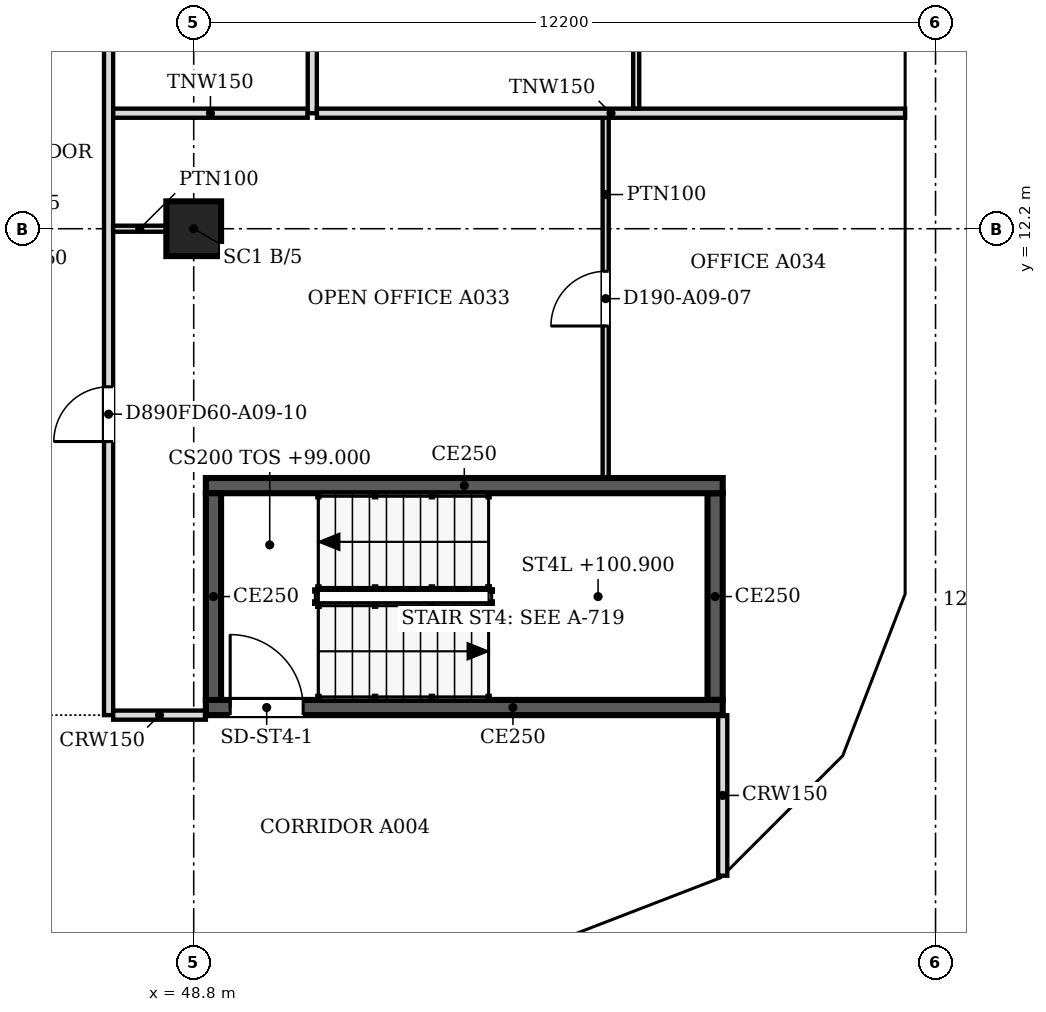
"""IFC4 building model, lengths in metres.
Left out: names, types, materials, properties, quantities, classifications, styles, units other than length and angle.
Written with IfcOpenShell. Run it as: python <this file> out.ifc"""

import sys

from ifc_helpers import new_model, si_unit, direction, frame, frame_2d, origin, origin_2d, place, context, subcontext, project, spatial, polyline, rectangle, outline, extrude, faceted_brep, source, transform, mapped, element, fill, save


model = new_model("IFC4")
c1 = context("Model", 3, precision=1e-05, world=origin(), true_north=direction((0.0, 1.0)))
c2 = subcontext(c1, "Body", "Model", "MODEL_VIEW")
j1 = project(units=[si_unit("LENGTHUNIT", "METRE"), si_unit("PLANEANGLEUNIT", "RADIAN")], contexts=[c1])
p1 = place(None, origin())
s1 = spatial("IfcSite", under=j1, at=p1, CompositionType="ELEMENT")
p2 = place(p1, origin())
s2 = spatial("IfcBuilding", under=s1, at=p2, CompositionType="ELEMENT")
p3 = place(p2, frame((0.0, 0.0, 99.0)))
s3 = spatial("IfcBuildingStorey", under=s2, at=p3, CompositionType="ELEMENT", Elevation=99.0)
p4 = place(p3, frame((48.8, 12.2, 0.0), z_axis=(0.0, 0.0, 1.0), x_axis=(1.0, 0.0, 0.0)))
e1 = element("IfcColumn", 1, at=p4, inside=s3, PredefinedType="COLUMN", context=c2, shape_type="SweptSolid", body=[
    extrude(rectangle(XDim=0.9, YDim=0.9, at=origin_2d()), origin(), (0.0, 0.0, 1.0), 3.6),
])
m1 = source(origin(), c2, "Body", "Brep", [
    faceted_brep([(0.047, -0.25, 0.0), (2.997, -0.25, 3.8), (0.047, -0.25, 7.6), (0.0, -0.25, 7.541), (0.0, -0.25, 0.059), (0.093, 0.25, 7.54), (2.944, 0.25, 3.868), (2.944, 0.25, 3.732), (0.093, 0.25, 0.06), (2.997, 0.0, 3.8), (0.047, 0.0, 0.0), (0.047, 0.0, 7.6)], [[[0, 1, 2, 3, 4]], [[5, 6, 7, 8]], [[8, 7, 9, 1, 0, 10]], [[6, 5, 11, 2, 1, 9]], [[3, 2, 11]], [[10, 0, 4]], [[8, 10, 4, 3, 11, 5]], [[9, 7, 6]]]),
])
p5 = place(p3, frame((54.81, 0.233, -3.8), z_axis=(0.0, 0.0, 1.0), x_axis=(0.932990326376, 0.359901446078, 0.0)))
e2 = element("IfcWall", 2, at=p5, inside=s3, PredefinedType="SOLIDWALL", context=c2, shape_type="MappedRepresentation", body=[
    mapped(m1, transform((0.0, 0.0, 0.0), scale=1.0)),
])
m2 = source(origin(), c2, "Body", "SweptSolid", [
    extrude(outline(polyline([(0.247, 0.665), (2.681, 3.8), (0.247, 6.935), (0.247, 0.665)])), frame((0.0, 0.26, 0.0), z_axis=(0.0, -1.0, 0.0), x_axis=(1.0, 0.0, 0.0)), (0.0, 0.0, 1.0), 0.52),
])
p6 = place(p5, origin())
e3 = element("IfcOpeningElement", 3, at=p6, cuts=e2, PredefinedType="OPENING", context=c2, shape_type="MappedRepresentation", body=[
    mapped(m2, transform((0.0, 0.0, 0.0), scale=1.0)),
])
m3 = source(origin(), c2, "Body", "Brep", [
    faceted_brep([(2.944, -0.25, 0.0), (2.997, -0.25, 0.068), (2.997, -0.25, 7.532), (2.944, -0.25, 7.6), (0.0, -0.25, 3.8), (0.053, 0.25, 3.868), (2.891, 0.25, 7.532), (2.891, 0.25, 0.068), (0.053, 0.25, 3.732), (2.944, 0.0, 0.0), (2.944, 0.0, 7.6), (0.0, 0.0, 3.8)], [[[0, 1, 2, 3, 4]], [[5, 6, 7, 8]], [[1, 0, 9]], [[10, 3, 2]], [[6, 5, 11, 4, 3, 10]], [[8, 7, 9, 0, 4, 11]], [[8, 11, 5]], [[1, 9, 7, 6, 10, 2]]]),
])
p7 = place(p3, frame((57.606, 1.312, -3.8), z_axis=(0.0, 0.0, 1.0), x_axis=(0.707147509625, 0.707066050402, 0.0)))
e4 = element("IfcWall", 4, at=p7, inside=s3, PredefinedType="SOLIDWALL", context=c2, shape_type="MappedRepresentation", body=[
    mapped(m3, transform((0.0, 0.0, 0.0), scale=1.0)),
])
m4 = source(origin(), c2, "Body", "SweptSolid", [
    extrude(outline(polyline([(2.744, 6.934), (0.316, 3.8), (2.744, 0.666), (2.744, 6.934)])), frame((0.0, 0.26, 0.0), z_axis=(0.0, -1.0, 0.0), x_axis=(1.0, 0.0, 0.0)), (0.0, 0.0, 1.0), 0.52),
])
p8 = place(p7, origin())
e5 = element("IfcOpeningElement", 5, at=p8, cuts=e4, PredefinedType="OPENING", context=c2, shape_type="MappedRepresentation", body=[
    mapped(m4, transform((0.0, 0.0, 0.0), scale=1.0)),
])
m5 = source(origin(), c2, "Body", "Brep", [
    faceted_brep([(0.053, -0.25, 0.0), (3.003, -0.25, 3.8), (0.053, -0.25, 7.6), (0.0, -0.25, 7.532), (0.0, -0.25, 0.068), (0.106, 0.25, 7.532), (2.957, 0.25, 3.86), (2.957, 0.25, 3.74), (0.106, 0.25, 0.068), (3.003, 0.0, 3.8), (0.053, 0.0, 0.0), (0.053, 0.0, 7.6)], [[[0, 1, 2, 3, 4]], [[5, 6, 7, 8]], [[8, 7, 9, 1, 0, 10]], [[6, 5, 11, 2, 1, 9]], [[3, 2, 11]], [[10, 0, 4]], [[8, 10, 4, 3, 11, 5]], [[9, 7, 6]]]),
])
p9 = place(p3, frame((59.669, 3.344, -3.8), z_axis=(0.0, 0.0, 1.0), x_axis=(0.35992665181, 0.932980602862, 0.0)))
e6 = element("IfcWall", 6, at=p9, inside=s3, PredefinedType="SOLIDWALL", context=c2, shape_type="MappedRepresentation", body=[
    mapped(m5, transform((0.0, 0.0, 0.0), scale=1.0)),
])
m6 = source(origin(), c2, "Body", "SweptSolid", [
    extrude(outline(polyline([(0.253, 0.665), (2.687, 3.8), (0.253, 6.935), (0.253, 0.665)])), frame((0.0, 0.26, 0.0), z_axis=(0.0, -1.0, 0.0), x_axis=(1.0, 0.0, 0.0)), (0.0, 0.0, 1.0), 0.52),
])
p10 = place(p9, origin())
e7 = element("IfcOpeningElement", 7, at=p10, cuts=e6, PredefinedType="OPENING", context=c2, shape_type="MappedRepresentation", body=[
    mapped(m6, transform((0.0, 0.0, 0.0), scale=1.0)),
])
m7 = source(origin(), c2, "Body", "Brep", [
    faceted_brep([(3.003, -0.25, 0.0), (6.053, -0.25, 3.8), (3.003, -0.25, 7.6), (0.0, -0.25, 3.8), (0.047, 0.25, 3.859), (3.003, 0.25, 7.6), (6.053, 0.25, 3.8), (3.003, 0.25, 0.0), (0.047, 0.25, 3.741), (0.0, 0.0, 3.8)], [[[0, 1, 2, 3]], [[4, 5, 6, 7, 8]], [[7, 6, 1, 0]], [[6, 5, 2, 1]], [[5, 4, 9, 3, 2]], [[8, 7, 0, 3, 9]], [[8, 9, 4]]]),
])
p11 = place(p3, frame((60.75, 6.146, -3.8), z_axis=(0.0, 0.0, 1.0), x_axis=(0.0, 1.0, 0.0)))
e8 = element("IfcWall", 8, at=p11, inside=s3, PredefinedType="SOLIDWALL", context=c2, shape_type="MappedRepresentation", body=[
    mapped(m7, transform((0.0, 0.0, 0.0), scale=1.0)),
])
m8 = source(origin(), c2, "Body", "SweptSolid", [
    extrude(outline(polyline([(3.005, 0.401), (5.733, 3.8), (3.005, 7.199), (0.319, 3.8), (3.005, 0.401)])), frame((0.0, 0.26, 0.0), z_axis=(0.0, -1.0, 0.0), x_axis=(1.0, 0.0, 0.0)), (0.0, 0.0, 1.0), 0.52),
])
p12 = place(p11, origin())
e9 = element("IfcOpeningElement", 9, at=p12, cuts=e8, PredefinedType="OPENING", context=c2, shape_type="MappedRepresentation", body=[
    mapped(m8, transform((0.0, 0.0, 0.0), scale=1.0)),
])
m9 = source(origin(), c2, "Body", "SweptSolid", [
    extrude(outline(polyline([(3.05, 0.0), (6.1, 3.8), (3.05, 7.6), (0.0, 3.8), (3.05, 0.0)])), frame((0.0, 0.25, 0.0), z_axis=(0.0, -1.0, 0.0), x_axis=(1.0, 0.0, 0.0)), (0.0, 0.0, 1.0), 0.5),
])
p13 = place(p3, frame((60.75, 12.2, -3.8), z_axis=(0.0, 0.0, 1.0), x_axis=(0.0, 1.0, 0.0)))
e10 = element("IfcWall", 10, at=p13, inside=s3, PredefinedType="SOLIDWALL", context=c2, shape_type="MappedRepresentation", body=[
    mapped(m9, transform((0.0, 0.0, 0.0), scale=1.0)),
])
m10 = source(origin(), c2, "Body", "SweptSolid", [
    extrude(outline(polyline([(3.05, 0.399), (5.78, 3.8), (3.05, 7.201), (0.321, 3.8), (3.05, 0.399)])), frame((0.0, 0.26, 0.0), z_axis=(0.0, -1.0, 0.0), x_axis=(1.0, 0.0, 0.0)), (0.0, 0.0, 1.0), 0.52),
])
p14 = place(p13, origin())
e11 = element("IfcOpeningElement", 11, at=p14, cuts=e10, PredefinedType="OPENING", context=c2, shape_type="MappedRepresentation", body=[
    mapped(m10, transform((0.0, 0.0, 0.0), scale=1.0)),
])
p15 = place(p2, frame((0.0, 0.0, 102.8)))
s4 = spatial("IfcBuildingStorey", under=s2, at=p15, CompositionType="ELEMENT", Elevation=102.8)
m11 = source(origin(), c2, "Body", "Brep", [
    faceted_brep([(2.95, -0.25, 0.0), (3.003, -0.25, 0.068), (3.003, -0.25, 7.532), (2.95, -0.25, 7.6), (0.0, -0.25, 3.8), (0.047, 0.25, 3.86), (2.898, 0.25, 7.532), (2.898, 0.25, 0.068), (0.047, 0.25, 3.74), (2.95, 0.0, 0.0), (2.95, 0.0, 7.6), (0.0, 0.0, 3.8)], [[[0, 1, 2, 3, 4]], [[5, 6, 7, 8]], [[1, 0, 9]], [[10, 3, 2]], [[6, 5, 11, 4, 3, 10]], [[8, 7, 9, 0, 4, 11]], [[8, 11, 5]], [[1, 9, 7, 6, 10, 2]]]),
])
p16 = place(p15, frame((54.854, 0.25, -3.8), z_axis=(0.0, 0.0, 1.0), x_axis=(0.932970071518, 0.359953949349, 0.0)))
e12 = element("IfcWall", 12, at=p16, inside=s4, PredefinedType="SOLIDWALL", context=c2, shape_type="MappedRepresentation", body=[
    mapped(m11, transform((0.0, 0.0, 0.0), scale=1.0)),
])
m12 = source(origin(), c2, "Body", "SweptSolid", [
    extrude(outline(polyline([(2.75, 6.935), (0.316, 3.8), (2.75, 0.665), (2.75, 6.935)])), frame((0.0, 0.26, 0.0), z_axis=(0.0, -1.0, 0.0), x_axis=(1.0, 0.0, 0.0)), (0.0, 0.0, 1.0), 0.52),
])
p17 = place(p16, origin())
e13 = element("IfcOpeningElement", 13, at=p17, cuts=e12, PredefinedType="OPENING", context=c2, shape_type="MappedRepresentation", body=[
    mapped(m12, transform((0.0, 0.0, 0.0), scale=1.0)),
])
m13 = source(origin(), c2, "Body", "Brep", [
    faceted_brep([(0.053, -0.25, 0.0), (2.997, -0.25, 3.8), (0.053, -0.25, 7.6), (0.0, -0.25, 7.532), (0.0, -0.25, 0.068), (0.106, 0.25, 7.532), (2.944, 0.25, 3.868), (2.944, 0.25, 3.732), (0.106, 0.25, 0.068), (2.997, 0.0, 3.8), (0.053, 0.0, 0.0), (0.053, 0.0, 7.6)], [[[0, 1, 2, 3, 4]], [[5, 6, 7, 8]], [[8, 7, 9, 1, 0, 10]], [[6, 5, 11, 2, 1, 9]], [[3, 2, 11]], [[10, 0, 4]], [[8, 10, 4, 3, 11, 5]], [[9, 7, 6]]]),
])
p18 = place(p15, frame((57.569, 1.274, -3.8), z_axis=(0.0, 0.0, 1.0), x_axis=(0.707066050402, 0.707147509625, 0.0)))
e14 = element("IfcWall", 14, at=p18, inside=s4, PredefinedType="SOLIDWALL", context=c2, shape_type="MappedRepresentation", body=[
    mapped(m13, transform((0.0, 0.0, 0.0), scale=1.0)),
])
m14 = source(origin(), c2, "Body", "SweptSolid", [
    extrude(outline(polyline([(0.253, 0.666), (2.681, 3.8), (0.253, 6.934), (0.253, 0.666)])), frame((0.0, 0.26, 0.0), z_axis=(0.0, -1.0, 0.0), x_axis=(1.0, 0.0, 0.0)), (0.0, 0.0, 1.0), 0.52),
])
p19 = place(p18, origin())
e15 = element("IfcOpeningElement", 15, at=p19, cuts=e14, PredefinedType="OPENING", context=c2, shape_type="MappedRepresentation", body=[
    mapped(m14, transform((0.0, 0.0, 0.0), scale=1.0)),
])
m15 = source(origin(), c2, "Body", "Brep", [
    faceted_brep([(2.95, -0.25, 0.0), (2.997, -0.25, 0.059), (2.997, -0.25, 7.541), (2.95, -0.25, 7.6), (0.0, -0.25, 3.8), (0.053, 0.25, 3.868), (2.904, 0.25, 7.54), (2.904, 0.25, 0.06), (0.053, 0.25, 3.732), (2.95, 0.0, 0.0), (2.95, 0.0, 7.6), (0.0, 0.0, 3.8)], [[[0, 1, 2, 3, 4]], [[5, 6, 7, 8]], [[1, 0, 9]], [[10, 3, 2]], [[6, 5, 11, 4, 3, 10]], [[8, 7, 9, 0, 4, 11]], [[8, 11, 5]], [[1, 9, 7, 6, 10, 2]]]),
])
p20 = place(p15, frame((59.688, 3.394, -3.8), z_axis=(0.0, 0.0, 1.0), x_axis=(0.359972353723, 0.932962970624, 0.0)))
e16 = element("IfcWall", 16, at=p20, inside=s4, PredefinedType="SOLIDWALL", context=c2, shape_type="MappedRepresentation", body=[
    mapped(m15, transform((0.0, 0.0, 0.0), scale=1.0)),
])
p21 = place(p20, origin())
e17 = element("IfcOpeningElement", 17, at=p21, cuts=e16, PredefinedType="OPENING", context=c2, shape_type="MappedRepresentation", body=[
    mapped(m12, transform((0.0, 0.0, 0.0), scale=1.0)),
])
m16 = source(origin(), c2, "Body", "Brep", [
    faceted_brep([(0.047, -0.25, 0.0), (3.05, -0.25, 3.8), (0.047, -0.25, 7.6), (0.0, -0.25, 7.54), (0.0, -0.25, 0.06), (0.093, 0.25, 7.541), (3.05, 0.25, 3.8), (0.093, 0.25, 0.059), (0.047, 0.0, 0.0), (0.047, 0.0, 7.6)], [[[0, 1, 2, 3, 4]], [[5, 6, 7]], [[7, 6, 1, 0, 8]], [[6, 5, 9, 2, 1]], [[3, 2, 9]], [[8, 0, 4]], [[7, 8, 4, 3, 9, 5]]]),
])
p22 = place(p15, frame((60.75, 6.1, -3.8), z_axis=(0.0, 0.0, 1.0), x_axis=(0.0, 1.0, 0.0)))
e18 = element("IfcWall", 18, at=p22, inside=s4, PredefinedType="SOLIDWALL", context=c2, shape_type="MappedRepresentation", body=[
    mapped(m16, transform((0.0, 0.0, 0.0), scale=1.0)),
])
m17 = source(origin(), c2, "Body", "SweptSolid", [
    extrude(outline(polyline([(0.247, 0.656), (2.731, 3.8), (0.247, 6.944), (0.247, 0.656)])), frame((0.0, 0.26, 0.0), z_axis=(0.0, -1.0, 0.0), x_axis=(1.0, 0.0, 0.0)), (0.0, 0.0, 1.0), 0.52),
])
p23 = place(p22, origin())
e19 = element("IfcOpeningElement", 19, at=p23, cuts=e18, PredefinedType="OPENING", context=c2, shape_type="MappedRepresentation", body=[
    mapped(m17, transform((0.0, 0.0, 0.0), scale=1.0)),
])
p24 = place(p15, frame((60.75, 9.15, -3.8), z_axis=(0.0, 0.0, 1.0), x_axis=(0.0, 1.0, 0.0)))
e20 = element("IfcWall", 20, at=p24, inside=s4, PredefinedType="SOLIDWALL", context=c2, shape_type="MappedRepresentation", body=[
    mapped(m9, transform((0.0, 0.0, 0.0), scale=1.0)),
])
p25 = place(p24, origin())
e21 = element("IfcOpeningElement", 21, at=p25, cuts=e20, PredefinedType="OPENING", context=c2, shape_type="MappedRepresentation", body=[
    mapped(m10, transform((0.0, 0.0, 0.0), scale=1.0)),
])
p26 = place(p3, frame((57.5, 4.325, 0.0), z_axis=(0.0, 0.0, 1.0), x_axis=(-1.0, 0.0, 0.0)))
e22 = element("IfcWall", 22, at=p26, inside=s3, PredefinedType="SOLIDWALL", context=c2, shape_type="SweptSolid", body=[
    extrude(rectangle(XDim=8.5, YDim=0.25, at=frame_2d((4.25, 0.0))), origin(), (0.0, 0.0, 1.0), 3.8),
])
m18 = source(origin(), c2, "Body", "SweptSolid", [
    extrude(rectangle(XDim=1.2, YDim=2.1, at=frame_2d((0.6, 1.05))), frame((0.0, 0.135, 0.0), z_axis=(0.0, -1.0, 0.0), x_axis=(1.0, 0.0, 0.0)), (0.0, 0.0, 1.0), 0.27),
])
p27 = place(p26, frame((6.9, 0.0, 0.0)))
e23 = element("IfcOpeningElement", 23, at=p27, cuts=e22, PredefinedType="OPENING", context=c2, shape_type="MappedRepresentation", body=[
    mapped(m18, transform((0.0, 0.0, 0.0), scale=1.0)),
])
p28 = place(p3, frame((49.125, 4.45, 0.0), z_axis=(0.0, 0.0, 1.0), x_axis=(0.0, 1.0, 0.0)))
e24 = element("IfcWall", 24, at=p28, inside=s3, PredefinedType="SOLIDWALL", context=c2, shape_type="SweptSolid", body=[
    extrude(rectangle(XDim=3.4, YDim=0.25, at=frame_2d((1.7, 0.0))), origin(), (0.0, 0.0, 1.0), 3.8),
])
p29 = place(p3, frame((49.0, 7.975, 0.0), z_axis=(0.0, 0.0, 1.0), x_axis=(1.0, 0.0, 0.0)))
e25 = element("IfcWall", 25, at=p29, inside=s3, PredefinedType="SOLIDWALL", context=c2, shape_type="SweptSolid", body=[
    extrude(rectangle(XDim=8.5, YDim=0.25, at=frame_2d((4.25, 0.0))), origin(), (0.0, 0.0, 1.0), 3.8),
])
p30 = place(p3, frame((57.375, 7.85, 0.0), z_axis=(0.0, 0.0, 1.0), x_axis=(0.0, -1.0, 0.0)))
e26 = element("IfcWall", 26, at=p30, inside=s3, PredefinedType="SOLIDWALL", context=c2, shape_type="SweptSolid", body=[
    extrude(rectangle(XDim=3.4, YDim=0.25, at=frame_2d((1.7, 0.0))), origin(), (0.0, 0.0, 1.0), 3.8),
])
p31 = place(p3, frame((57.5, 1.559, 0.0), z_axis=(0.0, 0.0, 1.0), x_axis=(0.0, 1.0, 0.0)))
e27 = element("IfcWall", 27, at=p31, inside=s3, PredefinedType="PARTITIONING", context=c2, shape_type="SweptSolid", body=[
    extrude(rectangle(XDim=2.641, YDim=0.15, at=frame_2d((1.32, 0.0))), origin(), (0.0, 0.0, 1.0), 3.067),
])
p32 = place(p3, frame((47.4, 22.3, 0.0), z_axis=(0.0, 0.0, 1.0), x_axis=(0.0, -1.0, 0.0)))
e28 = element("IfcWall", 28, at=p32, inside=s3, PredefinedType="PARTITIONING", context=c2, shape_type="SweptSolid", body=[
    extrude(rectangle(XDim=18.1, YDim=0.15, at=frame_2d((9.05, 0.0))), origin(), (0.0, 0.0, 1.0), 3.067),
])
m19 = source(origin(), c2, "Body", "SweptSolid", [
    extrude(rectangle(XDim=1.0, YDim=2.1, at=frame_2d((0.5, 1.05))), frame((0.0, 0.085, 0.0), z_axis=(0.0, -1.0, 0.0), x_axis=(1.0, 0.0, 0.0)), (0.0, 0.0, 1.0), 0.17),
])
p33 = place(p32, frame((3.599, 0.0, 0.0)))
e29 = element("IfcOpeningElement", 29, at=p33, cuts=e28, PredefinedType="OPENING", context=c2, shape_type="MappedRepresentation", body=[
    mapped(m19, transform((0.0, 0.0, 0.0), scale=1.0)),
])
m20 = source(origin(), c2, "Body", "SweptSolid", [
    extrude(rectangle(XDim=0.9, YDim=2.1, at=frame_2d((0.45, 1.05))), frame((0.0, 0.085, 0.0), z_axis=(0.0, -1.0, 0.0), x_axis=(1.0, 0.0, 0.0)), (0.0, 0.0, 1.0), 0.17),
])
p34 = place(p32, frame((12.7, 0.0, 0.0)))
e30 = element("IfcOpeningElement", 30, at=p34, cuts=e28, PredefinedType="OPENING", context=c2, shape_type="MappedRepresentation", body=[
    mapped(m20, transform((0.0, 0.0, 0.0), scale=1.0)),
])
p35 = place(p3, frame((47.476, 4.2, 0.0), z_axis=(0.0, 0.0, 1.0), x_axis=(1.0, 0.0, 0.0)))
e31 = element("IfcWall", 31, at=p35, inside=s3, PredefinedType="PARTITIONING", context=c2, shape_type="SweptSolid", body=[
    extrude(rectangle(XDim=1.524, YDim=0.15, at=frame_2d((0.762, 0.0))), origin(), (0.0, 0.0, 1.0), 3.067),
])
p36 = place(p3, frame((55.575, 14.024, 0.0), z_axis=(0.0, 0.0, 1.0), x_axis=(0.0, -1.0, 0.0)))
e32 = element("IfcWall", 32, at=p36, inside=s3, PredefinedType="PARTITIONING", context=c2, shape_type="SweptSolid", body=[
    extrude(rectangle(XDim=5.924, YDim=0.1, at=frame_2d((2.962, 0.0))), origin(), (0.0, 0.0, 1.0), 3.067),
])
m21 = source(origin(), c2, "Body", "SweptSolid", [
    extrude(rectangle(XDim=0.9, YDim=2.1, at=frame_2d((0.45, 1.05))), frame((0.0, 0.06, 0.0), z_axis=(0.0, -1.0, 0.0), x_axis=(1.0, 0.0, 0.0)), (0.0, 0.0, 1.0), 0.12),
])
p37 = place(p36, frame((2.524, 0.0, 0.0)))
e33 = element("IfcOpeningElement", 33, at=p37, cuts=e32, PredefinedType="OPENING", context=c2, shape_type="MappedRepresentation", body=[
    mapped(m21, transform((0.0, 0.0, 0.0), scale=1.0)),
])
p38 = place(p3, frame((48.35, 12.2, 0.0), z_axis=(0.0, 0.0, 1.0), x_axis=(-1.0, 0.0, 0.0)))
e34 = element("IfcWall", 34, at=p38, inside=s3, PredefinedType="PARTITIONING", context=c2, shape_type="SweptSolid", body=[
    extrude(rectangle(XDim=0.875, YDim=0.1, at=frame_2d((0.438, 0.0))), origin(), (0.0, 0.0, 1.0), 3.067),
])
p39 = place(p3, frame((47.476, 14.1, 0.0), z_axis=(0.0, 0.0, 1.0), x_axis=(1.0, 0.0, 0.0)))
e35 = element("IfcWall", 35, at=p39, inside=s3, PredefinedType="PARTITIONING", context=c2, shape_type="SweptSolid", body=[
    extrude(rectangle(XDim=3.198, YDim=0.15, at=frame_2d((1.599, 0.0))), origin(), (0.0, 0.0, 1.0), 3.067),
])
p40 = place(p3, frame((50.75, 22.224, 0.0), z_axis=(0.0, 0.0, 1.0), x_axis=(0.0, -1.0, 0.0)))
e36 = element("IfcWall", 36, at=p40, inside=s3, PredefinedType="PARTITIONING", context=c2, shape_type="SweptSolid", body=[
    extrude(rectangle(XDim=8.124, YDim=0.15, at=frame_2d((4.062, 0.0))), origin(), (0.0, 0.0, 1.0), 3.067),
])
p41 = place(p40, frame((3.624, 0.0, 0.0)))
e37 = element("IfcOpeningElement", 37, at=p41, cuts=e36, PredefinedType="OPENING", context=c2, shape_type="MappedRepresentation", body=[
    mapped(m20, transform((0.0, 0.0, 0.0), scale=1.0)),
])
p42 = place(p3, frame((50.826, 14.1, 0.0), z_axis=(0.0, 0.0, 1.0), x_axis=(1.0, 0.0, 0.0)))
e38 = element("IfcWall", 38, at=p42, inside=s3, PredefinedType="PARTITIONING", context=c2, shape_type="SweptSolid", body=[
    extrude(rectangle(XDim=9.674, YDim=0.15, at=frame_2d((4.837, 0.0))), origin(), (0.0, 0.0, 1.0), 3.067),
])
p43 = place(p3, frame((56.077, 22.224, 0.0), z_axis=(0.0, 0.0, 1.0), x_axis=(0.0, -1.0, 0.0)))
e39 = element("IfcWall", 39, at=p43, inside=s3, PredefinedType="PARTITIONING", context=c2, shape_type="SweptSolid", body=[
    extrude(rectangle(XDim=8.048, YDim=0.1, at=frame_2d((4.024, 0.0))), origin(), (0.0, 0.0, 1.0), 3.067),
])
p44 = place(p43, frame((3.548, 0.0, 0.0)))
e40 = element("IfcOpeningElement", 40, at=p44, cuts=e39, PredefinedType="OPENING", context=c2, shape_type="MappedRepresentation", body=[
    mapped(m21, transform((0.0, 0.0, 0.0), scale=1.0)),
])
m22 = source(origin(), c2, "Body", "SweptSolid", [
    extrude(rectangle(XDim=1.2, YDim=2.1, at=frame_2d((0.6, 1.05))), frame((0.0, 0.025, 0.0), z_axis=(0.0, -1.0, 0.0), x_axis=(1.0, 0.0, 0.0)), (0.0, 0.0, 1.0), 0.05),
])
p45 = place(p27, origin())
e41 = element("IfcDoor", 41, at=p45, inside=s3, OperationType="SINGLE_SWING_RIGHT", PredefinedType="DOOR", context=c2, shape_type="MappedRepresentation", body=[
    mapped(m22, transform((0.0, 0.0, 0.0), scale=1.0)),
])
fill(e23, e41)
m23 = source(origin(), c2, "Body", "SweptSolid", [
    extrude(rectangle(XDim=0.9, YDim=2.1, at=frame_2d((0.45, 1.05))), frame((0.0, 0.025, 0.0), z_axis=(0.0, -1.0, 0.0), x_axis=(1.0, 0.0, 0.0)), (0.0, 0.0, 1.0), 0.05),
])
p46 = place(p37, origin())
e42 = element("IfcDoor", 42, at=p46, inside=s3, OperationType="SINGLE_SWING_RIGHT", PredefinedType="DOOR", context=c2, shape_type="MappedRepresentation", body=[
    mapped(m23, transform((0.0, 0.0, 0.0), scale=1.0)),
])
fill(e33, e42)
p47 = place(p34, origin())
e43 = element("IfcDoor", 43, at=p47, inside=s3, OperationType="SINGLE_SWING_RIGHT", PredefinedType="DOOR", context=c2, shape_type="MappedRepresentation", body=[
    mapped(m23, transform((0.0, 0.0, 0.0), scale=1.0)),
])
fill(e30, e43)
save(model, sys.argv[1])
